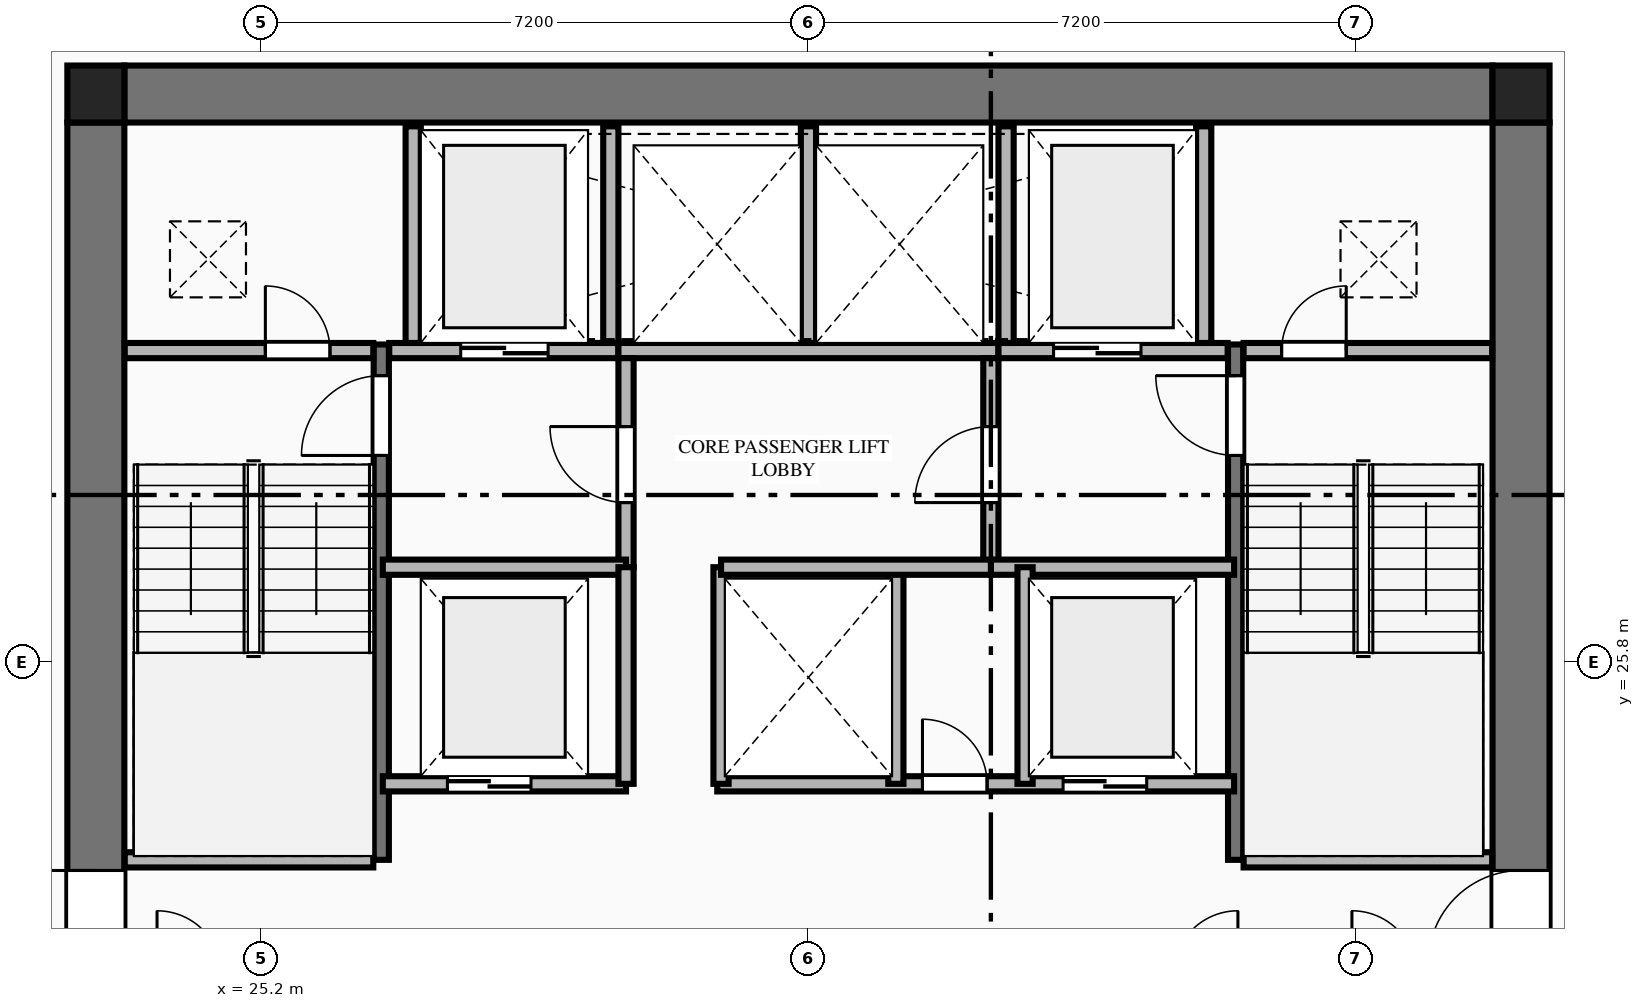
"""IFC4 building model, lengths in metres.
Left out: names, types, materials, properties, quantities, classifications, styles, units other than length and angle.
Written with IfcOpenShell. Run it as: python <this file> out.ifc"""

import sys

from ifc_helpers import new_model, si_unit, direction, frame, frame_2d, origin, origin_2d, place, context, subcontext, project, spatial, rectangle, extrude, element, fill, save


model = new_model("IFC4")
c1 = context("Model", 3, precision=1e-05, world=origin(), true_north=direction((0.0, 1.0)))
c2 = subcontext(c1, "Body", "Model", "MODEL_VIEW")
j1 = project(units=[si_unit("LENGTHUNIT", "METRE"), si_unit("PLANEANGLEUNIT", "RADIAN")], contexts=[c1])
p1 = place(None, origin())
s1 = spatial("IfcSite", under=j1, at=p1, CompositionType="ELEMENT")
p2 = place(p1, origin())
s2 = spatial("IfcBuilding", under=s1, at=p2, CompositionType="ELEMENT")
p3 = place(p2, frame((0.0, 0.0, 123.25)))
s3 = spatial("IfcBuildingStorey", under=s2, at=p3, CompositionType="ELEMENT", Elevation=123.25)
for number, where, z_axis, x_axis in (
    (1, (41.775, 33.275, 0.0), (0.0, 0.0, 1.0), (1.0, 0.0, 0.0)),
    (2, (23.025, 33.275, 0.0), (0.0, 0.0, 1.0), (1.0, 0.0, 0.0)),
):
    element("IfcColumn", number, at=place(p3, frame(where, z_axis=z_axis, x_axis=x_axis)), inside=s3, PredefinedType="COLUMN", context=c2, shape_type="SweptSolid", body=[
        extrude(rectangle(XDim=0.75, YDim=0.75, at=origin_2d()), origin(), (0.0, 0.0, 1.0), 3.55),
    ])
p4 = place(p3, frame((23.4, 33.275, 0.0), z_axis=(0.0, 0.0, 1.0), x_axis=(1.0, 0.0, 0.0)))
e3 = element("IfcWall", 3, at=p4, inside=s3, PredefinedType="SHEAR", context=c2, shape_type="SweptSolid", body=[
    extrude(rectangle(XDim=18.0, YDim=0.75, at=frame_2d((9.0, 0.0))), origin(), (0.0, 0.0, 1.0), 3.34),
])
p5 = place(p3, frame((23.025, 18.9, 0.0), z_axis=(0.0, 0.0, 1.0), x_axis=(0.0, 1.0, 0.0)))
e4 = element("IfcWall", 4, at=p5, inside=s3, PredefinedType="SHEAR", context=c2, shape_type="SweptSolid", body=[
    extrude(rectangle(XDim=14.0, YDim=0.75, at=frame_2d((7.0, 0.0))), origin(), (0.0, 0.0, 1.0), 3.34),
])
p6 = place(p5, frame((2.94, 0.0, 0.0)))
e5 = element("IfcOpeningElement", 5, at=p6, cuts=e4, PredefinedType="OPENING", context=c2, shape_type="SweptSolid", body=[
    extrude(rectangle(XDim=1.22, YDim=2.25, at=frame_2d((0.61, 1.125))), frame((0.0, 0.385, 0.0), z_axis=(0.0, -1.0, 0.0), x_axis=(1.0, 0.0, 0.0)), (0.0, 0.0, 1.0), 0.77),
])
p7 = place(p3, frame((41.775, 18.9, 0.0), z_axis=(0.0, 0.0, 1.0), x_axis=(0.0, 1.0, 0.0)))
e6 = element("IfcWall", 6, at=p7, inside=s3, PredefinedType="SHEAR", context=c2, shape_type="SweptSolid", body=[
    extrude(rectangle(XDim=14.0, YDim=0.75, at=frame_2d((7.0, 0.0))), origin(), (0.0, 0.0, 1.0), 3.34),
])
p8 = place(p7, frame((2.94, 0.0, 0.0)))
e7 = element("IfcOpeningElement", 7, at=p8, cuts=e6, PredefinedType="OPENING", context=c2, shape_type="SweptSolid", body=[
    extrude(rectangle(XDim=1.22, YDim=2.25, at=frame_2d((0.61, 1.125))), frame((0.0, 0.385, 0.0), z_axis=(0.0, -1.0, 0.0), x_axis=(1.0, 0.0, 0.0)), (0.0, 0.0, 1.0), 0.77),
])
p9 = place(p3, frame((26.78, 23.2, 0.0), z_axis=(0.0, 0.0, 1.0), x_axis=(0.0, 1.0, 0.0)))
e8 = element("IfcWall", 8, at=p9, inside=s3, PredefinedType="SHEAR", context=c2, shape_type="SweptSolid", body=[
    extrude(rectangle(XDim=6.78, YDim=0.2, at=frame_2d((3.39, 0.0))), origin(), (0.0, 0.0, 1.0), 3.55),
])
p10 = place(p9, frame((5.32, 0.0, 0.0)))
e9 = element("IfcOpeningElement", 9, at=p10, cuts=e8, PredefinedType="OPENING", context=c2, shape_type="SweptSolid", body=[
    extrude(rectangle(XDim=1.05, YDim=2.15, at=frame_2d((0.525, 1.075))), frame((0.0, 0.11, 0.0), z_axis=(0.0, -1.0, 0.0), x_axis=(1.0, 0.0, 0.0)), (0.0, 0.0, 1.0), 0.22),
])
p11 = place(p3, frame((23.405, 23.2, 0.0), z_axis=(0.0, 0.0, 1.0), x_axis=(1.0, 0.0, 0.0)))
e10 = element("IfcWall", 10, at=p11, inside=s3, PredefinedType="PLUMBINGWALL", context=c2, shape_type="SweptSolid", body=[
    extrude(rectangle(XDim=3.27, YDim=0.2, at=frame_2d((1.635, 0.0))), origin(), (0.0, 0.0, 1.0), 3.34),
])
p12 = place(p3, frame((38.02, 23.2, 0.0), z_axis=(0.0, 0.0, 1.0), x_axis=(0.0, 1.0, 0.0)))
e11 = element("IfcWall", 11, at=p12, inside=s3, PredefinedType="SHEAR", context=c2, shape_type="SweptSolid", body=[
    extrude(rectangle(XDim=6.78, YDim=0.2, at=frame_2d((3.39, 0.0))), origin(), (0.0, 0.0, 1.0), 3.55),
])
p13 = place(p12, frame((5.32, 0.0, 0.0)))
e12 = element("IfcOpeningElement", 12, at=p13, cuts=e11, PredefinedType="OPENING", context=c2, shape_type="SweptSolid", body=[
    extrude(rectangle(XDim=1.05, YDim=2.15, at=frame_2d((0.525, 1.075))), frame((0.0, 0.11, 0.0), z_axis=(0.0, -1.0, 0.0), x_axis=(1.0, 0.0, 0.0)), (0.0, 0.0, 1.0), 0.22),
])
p14 = place(p3, frame((38.125, 23.2, 0.0), z_axis=(0.0, 0.0, 1.0), x_axis=(1.0, 0.0, 0.0)))
e13 = element("IfcWall", 13, at=p14, inside=s3, PredefinedType="PLUMBINGWALL", context=c2, shape_type="SweptSolid", body=[
    extrude(rectangle(XDim=3.27, YDim=0.2, at=frame_2d((1.635, 0.0))), origin(), (0.0, 0.0, 1.0), 3.34),
])
p15 = place(p3, frame((23.405, 29.9, 0.0), z_axis=(0.0, 0.0, 1.0), x_axis=(1.0, 0.0, 0.0)))
e14 = element("IfcWall", 14, at=p15, inside=s3, PredefinedType="PLUMBINGWALL", context=c2, shape_type="SweptSolid", body=[
    extrude(rectangle(XDim=3.27, YDim=0.2, at=frame_2d((1.635, 0.0))), origin(), (0.0, 0.0, 1.0), 3.34),
])
p16 = place(p15, frame((1.85, 0.0, 0.0)))
e15 = element("IfcOpeningElement", 15, at=p16, cuts=e14, PredefinedType="OPENING", context=c2, shape_type="SweptSolid", body=[
    extrude(rectangle(XDim=0.85, YDim=2.05, at=frame_2d((0.425, 1.025))), frame((0.0, 0.11, 0.0), z_axis=(0.0, -1.0, 0.0), x_axis=(1.0, 0.0, 0.0)), (0.0, 0.0, 1.0), 0.22),
])
p17 = place(p3, frame((26.885, 29.9, 0.0), z_axis=(0.0, 0.0, 1.0), x_axis=(1.0, 0.0, 0.0)))
e16 = element("IfcWall", 16, at=p17, inside=s3, PredefinedType="PLUMBINGWALL", context=c2, shape_type="SweptSolid", body=[
    extrude(rectangle(XDim=3.015, YDim=0.2, at=frame_2d((1.507, 0.0))), origin(), (0.0, 0.0, 1.0), 3.34),
])
p18 = place(p17, frame((0.94, 0.0, 0.0)))
e17 = element("IfcOpeningElement", 17, at=p18, cuts=e16, PredefinedType="OPENING", context=c2, shape_type="SweptSolid", body=[
    extrude(rectangle(XDim=1.15, YDim=2.2, at=frame_2d((0.575, 1.1))), frame((0.0, 0.11, 0.0), z_axis=(0.0, -1.0, 0.0), x_axis=(1.0, 0.0, 0.0)), (0.0, 0.0, 1.0), 0.22),
])
p19 = place(p3, frame((29.9, 29.9, 0.0), z_axis=(0.0, 0.0, 1.0), x_axis=(1.0, 0.0, 0.0)))
e18 = element("IfcWall", 18, at=p19, inside=s3, PredefinedType="PLUMBINGWALL", context=c2, shape_type="SweptSolid", body=[
    extrude(rectangle(XDim=5.0, YDim=0.2, at=frame_2d((2.5, 0.0))), origin(), (0.0, 0.0, 1.0), 3.34),
])
p20 = place(p3, frame((34.9, 29.9, 0.0), z_axis=(0.0, 0.0, 1.0), x_axis=(1.0, 0.0, 0.0)))
e19 = element("IfcWall", 19, at=p20, inside=s3, PredefinedType="PLUMBINGWALL", context=c2, shape_type="SweptSolid", body=[
    extrude(rectangle(XDim=3.015, YDim=0.2, at=frame_2d((1.508, 0.0))), origin(), (0.0, 0.0, 1.0), 3.34),
])
p21 = place(p20, frame((0.725, 0.0, 0.0)))
e20 = element("IfcOpeningElement", 20, at=p21, cuts=e19, PredefinedType="OPENING", context=c2, shape_type="SweptSolid", body=[
    extrude(rectangle(XDim=1.15, YDim=2.2, at=frame_2d((0.575, 1.1))), frame((0.0, 0.11, 0.0), z_axis=(0.0, -1.0, 0.0), x_axis=(1.0, 0.0, 0.0)), (0.0, 0.0, 1.0), 0.22),
])
p22 = place(p3, frame((38.125, 29.9, 0.0), z_axis=(0.0, 0.0, 1.0), x_axis=(1.0, 0.0, 0.0)))
e21 = element("IfcWall", 21, at=p22, inside=s3, PredefinedType="PLUMBINGWALL", context=c2, shape_type="SweptSolid", body=[
    extrude(rectangle(XDim=3.27, YDim=0.2, at=frame_2d((1.635, 0.0))), origin(), (0.0, 0.0, 1.0), 3.34),
])
p23 = place(p22, frame((0.5, 0.0, 0.0)))
e22 = element("IfcOpeningElement", 22, at=p23, cuts=e21, PredefinedType="OPENING", context=c2, shape_type="SweptSolid", body=[
    extrude(rectangle(XDim=0.85, YDim=2.05, at=frame_2d((0.425, 1.025))), frame((0.0, 0.11, 0.0), z_axis=(0.0, -1.0, 0.0), x_axis=(1.0, 0.0, 0.0)), (0.0, 0.0, 1.0), 0.22),
])
for number, where, z_axis, x_axis in (
    (23, (27.2, 30.0, 0.0), (0.0, 0.0, 1.0), (0.0, 1.0, 0.0)),
    (24, (29.8, 30.0, 0.0), (0.0, 0.0, 1.0), (0.0, 1.0, 0.0)),
    (25, (32.4, 30.0, 0.0), (0.0, 0.0, 1.0), (0.0, 1.0, 0.0)),
    (26, (35.0, 30.0, 0.0), (0.0, 0.0, 1.0), (0.0, 1.0, 0.0)),
    (27, (37.6, 30.0, 0.0), (0.0, 0.0, 1.0), (0.0, 1.0, 0.0)),
):
    element("IfcWall", number, at=place(p3, frame(where, z_axis=z_axis, x_axis=x_axis)), inside=s3, PredefinedType="PLUMBINGWALL", context=c2, shape_type="SweptSolid", body=[
        extrude(rectangle(XDim=2.85, YDim=0.2, at=frame_2d((1.425, 0.0))), origin(), (0.0, 0.0, 1.0), 3.34),
    ])
p24 = place(p3, frame((30.0, 27.05, 0.0), z_axis=(0.0, 0.0, 1.0), x_axis=(0.0, 1.0, 0.0)))
e28 = element("IfcWall", 28, at=p24, inside=s3, PredefinedType="PLUMBINGWALL", context=c2, shape_type="SweptSolid", body=[
    extrude(rectangle(XDim=2.75, YDim=0.2, at=frame_2d((1.375, 0.0))), origin(), (0.0, 0.0, 1.0), 3.34),
])
p25 = place(p24, frame((0.85, 0.0, 0.0)))
e29 = element("IfcOpeningElement", 29, at=p25, cuts=e28, PredefinedType="OPENING", context=c2, shape_type="SweptSolid", body=[
    extrude(rectangle(XDim=1.0, YDim=2.15, at=frame_2d((0.5, 1.075))), frame((0.0, 0.11, 0.0), z_axis=(0.0, -1.0, 0.0), x_axis=(1.0, 0.0, 0.0)), (0.0, 0.0, 1.0), 0.22),
])
p26 = place(p3, frame((26.8, 27.05, 0.0), z_axis=(0.0, 0.0, 1.0), x_axis=(1.0, 0.0, 0.0)))
e30 = element("IfcWall", 30, at=p26, inside=s3, PredefinedType="PLUMBINGWALL", context=c2, shape_type="SweptSolid", body=[
    extrude(rectangle(XDim=3.2, YDim=0.2, at=frame_2d((1.6, 0.0))), origin(), (0.0, 0.0, 1.0), 3.34),
])
p27 = place(p3, frame((34.8, 27.05, 0.0), z_axis=(0.0, 0.0, 1.0), x_axis=(0.0, 1.0, 0.0)))
e31 = element("IfcWall", 31, at=p27, inside=s3, PredefinedType="PLUMBINGWALL", context=c2, shape_type="SweptSolid", body=[
    extrude(rectangle(XDim=2.75, YDim=0.2, at=frame_2d((1.375, 0.0))), origin(), (0.0, 0.0, 1.0), 3.34),
])
p28 = place(p27, frame((0.85, 0.0, 0.0)))
e32 = element("IfcOpeningElement", 32, at=p28, cuts=e31, PredefinedType="OPENING", context=c2, shape_type="SweptSolid", body=[
    extrude(rectangle(XDim=1.0, YDim=2.15, at=frame_2d((0.5, 1.075))), frame((0.0, 0.11, 0.0), z_axis=(0.0, -1.0, 0.0), x_axis=(1.0, 0.0, 0.0)), (0.0, 0.0, 1.0), 0.22),
])
p29 = place(p3, frame((34.8, 27.05, 0.0), z_axis=(0.0, 0.0, 1.0), x_axis=(1.0, 0.0, 0.0)))
e33 = element("IfcWall", 33, at=p29, inside=s3, PredefinedType="PLUMBINGWALL", context=c2, shape_type="SweptSolid", body=[
    extrude(rectangle(XDim=3.2, YDim=0.2, at=frame_2d((1.6, 0.0))), origin(), (0.0, 0.0, 1.0), 3.34),
])
p30 = place(p3, frame((26.8, 24.2, 0.0), z_axis=(0.0, 0.0, 1.0), x_axis=(1.0, 0.0, 0.0)))
e34 = element("IfcWall", 34, at=p30, inside=s3, PredefinedType="PLUMBINGWALL", context=c2, shape_type="SweptSolid", body=[
    extrude(rectangle(XDim=3.2, YDim=0.2, at=frame_2d((1.6, 0.0))), origin(), (0.0, 0.0, 1.0), 3.34),
])
p31 = place(p30, frame((0.85, 0.0, 0.0)))
e35 = element("IfcOpeningElement", 35, at=p31, cuts=e34, PredefinedType="OPENING", context=c2, shape_type="SweptSolid", body=[
    extrude(rectangle(XDim=1.1, YDim=2.2, at=frame_2d((0.55, 1.1))), frame((0.0, 0.11, 0.0), z_axis=(0.0, -1.0, 0.0), x_axis=(1.0, 0.0, 0.0)), (0.0, 0.0, 1.0), 0.22),
])
p32 = place(p3, frame((30.0, 24.2, 0.0), z_axis=(0.0, 0.0, 1.0), x_axis=(0.0, 1.0, 0.0)))
e36 = element("IfcWall", 36, at=p32, inside=s3, PredefinedType="PLUMBINGWALL", context=c2, shape_type="SweptSolid", body=[
    extrude(rectangle(XDim=2.85, YDim=0.2, at=frame_2d((1.425, 0.0))), origin(), (0.0, 0.0, 1.0), 3.34),
])
p33 = place(p3, frame((31.2, 24.2, 0.0), z_axis=(0.0, 0.0, 1.0), x_axis=(1.0, 0.0, 0.0)))
e37 = element("IfcWall", 37, at=p33, inside=s3, PredefinedType="PLUMBINGWALL", context=c2, shape_type="SweptSolid", body=[
    extrude(rectangle(XDim=6.8, YDim=0.2, at=frame_2d((3.4, 0.0))), origin(), (0.0, 0.0, 1.0), 3.34),
])
p34 = place(p33, frame((2.7, 0.0, 0.0)))
e38 = element("IfcOpeningElement", 38, at=p34, cuts=e37, PredefinedType="OPENING", context=c2, shape_type="SweptSolid", body=[
    extrude(rectangle(XDim=0.85, YDim=2.05, at=frame_2d((0.425, 1.025))), frame((0.0, 0.11, 0.0), z_axis=(0.0, -1.0, 0.0), x_axis=(1.0, 0.0, 0.0)), (0.0, 0.0, 1.0), 0.22),
])
p35 = place(p33, frame((4.55, 0.0, 0.0)))
e39 = element("IfcOpeningElement", 39, at=p35, cuts=e37, PredefinedType="OPENING", context=c2, shape_type="SweptSolid", body=[
    extrude(rectangle(XDim=1.1, YDim=2.2, at=frame_2d((0.55, 1.1))), frame((0.0, 0.11, 0.0), z_axis=(0.0, -1.0, 0.0), x_axis=(1.0, 0.0, 0.0)), (0.0, 0.0, 1.0), 0.22),
])
for number, where, z_axis, x_axis in (
    (40, (31.25, 24.2, 0.0), (0.0, 0.0, 1.0), (0.0, 1.0, 0.0)),
    (41, (33.55, 24.2, 0.0), (0.0, 0.0, 1.0), (0.0, 1.0, 0.0)),
    (42, (35.25, 24.2, 0.0), (0.0, 0.0, 1.0), (0.0, 1.0, 0.0)),
):
    element("IfcWall", number, at=place(p3, frame(where, z_axis=z_axis, x_axis=x_axis)), inside=s3, PredefinedType="PLUMBINGWALL", context=c2, shape_type="SweptSolid", body=[
        extrude(rectangle(XDim=2.85, YDim=0.2, at=frame_2d((1.425, 0.0))), origin(), (0.0, 0.0, 1.0), 3.34),
    ])
p36 = place(p3, frame((31.25, 27.05, 0.0), z_axis=(0.0, 0.0, 1.0), x_axis=(1.0, 0.0, 0.0)))
e43 = element("IfcWall", 43, at=p36, inside=s3, PredefinedType="PLUMBINGWALL", context=c2, shape_type="SweptSolid", body=[
    extrude(rectangle(XDim=3.55, YDim=0.2, at=frame_2d((1.775, 0.0))), origin(), (0.0, 0.0, 1.0), 3.34),
])
p37 = place(p6, origin())
e44 = element("IfcDoor", 44, at=p37, inside=s3, OperationType="SINGLE_SWING_RIGHT", PredefinedType="DOOR", context=c2, shape_type="SweptSolid", body=[
    extrude(rectangle(XDim=1.22, YDim=2.25, at=frame_2d((0.61, 1.125))), frame((0.0, 0.025, 0.0), z_axis=(0.0, -1.0, 0.0), x_axis=(1.0, 0.0, 0.0)), (0.0, 0.0, 1.0), 0.05),
])
fill(e5, e44)
p38 = place(p8, origin())
e45 = element("IfcDoor", 45, at=p38, inside=s3, OperationType="SINGLE_SWING_LEFT", PredefinedType="DOOR", context=c2, shape_type="SweptSolid", body=[
    extrude(rectangle(XDim=1.22, YDim=2.25, at=frame_2d((0.61, 1.125))), frame((0.0, 0.025, 0.0), z_axis=(0.0, -1.0, 0.0), x_axis=(1.0, 0.0, 0.0)), (0.0, 0.0, 1.0), 0.05),
])
fill(e7, e45)
p39 = place(p10, origin())
e46 = element("IfcDoor", 46, at=p39, inside=s3, OperationType="SINGLE_SWING_LEFT", PredefinedType="DOOR", context=c2, shape_type="SweptSolid", body=[
    extrude(rectangle(XDim=1.05, YDim=2.15, at=frame_2d((0.525, 1.075))), frame((0.0, 0.025, 0.0), z_axis=(0.0, -1.0, 0.0), x_axis=(1.0, 0.0, 0.0)), (0.0, 0.0, 1.0), 0.05),
])
fill(e9, e46)
p40 = place(p13, origin())
e47 = element("IfcDoor", 47, at=p40, inside=s3, OperationType="SINGLE_SWING_RIGHT", PredefinedType="DOOR", context=c2, shape_type="SweptSolid", body=[
    extrude(rectangle(XDim=1.05, YDim=2.15, at=frame_2d((0.525, 1.075))), frame((0.0, 0.025, 0.0), z_axis=(0.0, -1.0, 0.0), x_axis=(1.0, 0.0, 0.0)), (0.0, 0.0, 1.0), 0.05),
])
fill(e12, e47)
p41 = place(p16, origin())
e48 = element("IfcDoor", 48, at=p41, inside=s3, OperationType="SINGLE_SWING_LEFT", PredefinedType="DOOR", context=c2, shape_type="SweptSolid", body=[
    extrude(rectangle(XDim=0.85, YDim=2.05, at=frame_2d((0.425, 1.025))), frame((0.0, 0.025, 0.0), z_axis=(0.0, -1.0, 0.0), x_axis=(1.0, 0.0, 0.0)), (0.0, 0.0, 1.0), 0.05),
])
fill(e15, e48)
p42 = place(p23, origin())
e49 = element("IfcDoor", 49, at=p42, inside=s3, OperationType="SINGLE_SWING_RIGHT", PredefinedType="DOOR", context=c2, shape_type="SweptSolid", body=[
    extrude(rectangle(XDim=0.85, YDim=2.05, at=frame_2d((0.425, 1.025))), frame((0.0, 0.025, 0.0), z_axis=(0.0, -1.0, 0.0), x_axis=(1.0, 0.0, 0.0)), (0.0, 0.0, 1.0), 0.05),
])
fill(e22, e49)
p43 = place(p18, origin())
e50 = element("IfcDoor", 50, at=p43, inside=s3, OperationType="DOUBLE_DOOR_SLIDING", PredefinedType="DOOR", context=c2, shape_type="SweptSolid", body=[
    extrude(rectangle(XDim=1.15, YDim=2.2, at=frame_2d((0.575, 1.1))), frame((0.0, 0.025, 0.0), z_axis=(0.0, -1.0, 0.0), x_axis=(1.0, 0.0, 0.0)), (0.0, 0.0, 1.0), 0.05),
])
fill(e17, e50)
p44 = place(p21, origin())
e51 = element("IfcDoor", 51, at=p44, inside=s3, OperationType="DOUBLE_DOOR_SLIDING", PredefinedType="DOOR", context=c2, shape_type="SweptSolid", body=[
    extrude(rectangle(XDim=1.15, YDim=2.2, at=frame_2d((0.575, 1.1))), frame((0.0, 0.025, 0.0), z_axis=(0.0, -1.0, 0.0), x_axis=(1.0, 0.0, 0.0)), (0.0, 0.0, 1.0), 0.05),
])
fill(e20, e51)
p45 = place(p25, origin())
e52 = element("IfcDoor", 52, at=p45, inside=s3, OperationType="SINGLE_SWING_RIGHT", PredefinedType="DOOR", context=c2, shape_type="SweptSolid", body=[
    extrude(rectangle(XDim=1.0, YDim=2.15, at=frame_2d((0.5, 1.075))), frame((0.0, 0.025, 0.0), z_axis=(0.0, -1.0, 0.0), x_axis=(1.0, 0.0, 0.0)), (0.0, 0.0, 1.0), 0.05),
])
fill(e29, e52)
p46 = place(p28, origin())
e53 = element("IfcDoor", 53, at=p46, inside=s3, OperationType="SINGLE_SWING_LEFT", PredefinedType="DOOR", context=c2, shape_type="SweptSolid", body=[
    extrude(rectangle(XDim=1.0, YDim=2.15, at=frame_2d((0.5, 1.075))), frame((0.0, 0.025, 0.0), z_axis=(0.0, -1.0, 0.0), x_axis=(1.0, 0.0, 0.0)), (0.0, 0.0, 1.0), 0.05),
])
fill(e32, e53)
p47 = place(p31, origin())
e54 = element("IfcDoor", 54, at=p47, inside=s3, OperationType="DOUBLE_DOOR_SLIDING", PredefinedType="DOOR", context=c2, shape_type="SweptSolid", body=[
    extrude(rectangle(XDim=1.1, YDim=2.2, at=frame_2d((0.55, 1.1))), frame((0.0, 0.025, 0.0), z_axis=(0.0, -1.0, 0.0), x_axis=(1.0, 0.0, 0.0)), (0.0, 0.0, 1.0), 0.05),
])
fill(e35, e54)
p48 = place(p34, origin())
e55 = element("IfcDoor", 55, at=p48, inside=s3, OperationType="SINGLE_SWING_LEFT", PredefinedType="DOOR", context=c2, shape_type="SweptSolid", body=[
    extrude(rectangle(XDim=0.85, YDim=2.05, at=frame_2d((0.425, 1.025))), frame((0.0, 0.025, 0.0), z_axis=(0.0, -1.0, 0.0), x_axis=(1.0, 0.0, 0.0)), (0.0, 0.0, 1.0), 0.05),
])
fill(e38, e55)
p49 = place(p35, origin())
e56 = element("IfcDoor", 56, at=p49, inside=s3, OperationType="DOUBLE_DOOR_SLIDING", PredefinedType="DOOR", context=c2, shape_type="SweptSolid", body=[
    extrude(rectangle(XDim=1.1, YDim=2.2, at=frame_2d((0.55, 1.1))), frame((0.0, 0.025, 0.0), z_axis=(0.0, -1.0, 0.0), x_axis=(1.0, 0.0, 0.0)), (0.0, 0.0, 1.0), 0.05),
])
fill(e39, e56)
save(model, sys.argv[1])
